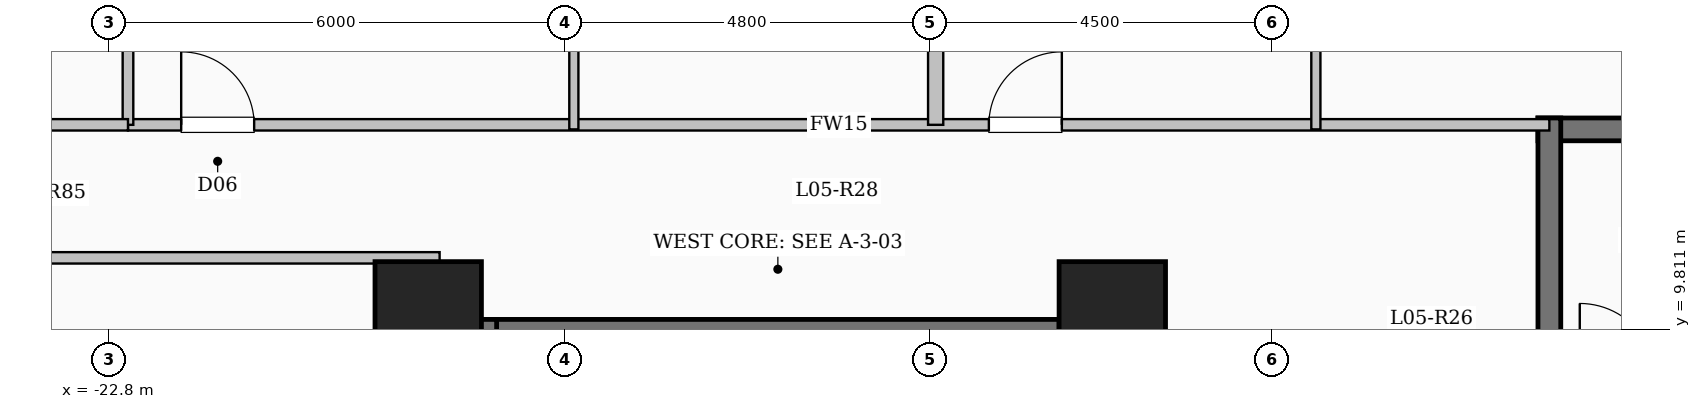
"""IFC4 building model, lengths in metres.
Left out: names, types, materials, properties, quantities, classifications, styles, units other than length and angle.
Written with IfcOpenShell. Run it as: python <this file> out.ifc"""

import sys

from ifc_helpers import new_model, si_unit, direction, frame, frame_2d, origin, origin_2d, place, context, subcontext, project, spatial, rectangle, extrude, element, fill, save


model = new_model("IFC4")
c1 = context("Model", 3, precision=1e-05, world=origin(), true_north=direction((0.0, 1.0)))
c2 = subcontext(c1, "Body", "Model", "MODEL_VIEW")
j1 = project(units=[si_unit("LENGTHUNIT", "METRE"), si_unit("PLANEANGLEUNIT", "RADIAN")], contexts=[c1])
p1 = place(None, origin())
s1 = spatial("IfcSite", under=j1, at=p1, CompositionType="ELEMENT")
p2 = place(p1, origin())
s2 = spatial("IfcBuilding", under=s1, at=p2, CompositionType="ELEMENT")
p3 = place(p2, frame((0.0, 0.0, 24.0)))
s3 = spatial("IfcBuildingStorey", under=s2, at=p3, CompositionType="ELEMENT", Elevation=24.0)
for number, where, z_axis, x_axis in (
    (1, (-9.6, 10.0, 0.0), (0.0, 0.0, 1.0), (1.0, 0.0, 0.0)),
    (2, (-18.6, 10.0, 0.0), (0.0, 0.0, 1.0), (1.0, 0.0, 0.0)),
):
    element("IfcColumn", number, at=place(p3, frame(where, z_axis=z_axis, x_axis=x_axis)), inside=s3, PredefinedType="COLUMN", context=c2, shape_type="SweptSolid", body=[
        extrude(rectangle(XDim=1.4, YDim=1.4, at=origin_2d()), origin(), (0.0, 0.0, 1.0), 3.35),
    ])
p4 = place(p3, frame((-18.0, 9.79, 0.0), z_axis=(0.0, 0.0, 1.0), x_axis=(1.0, 0.0, 0.0)))
e3 = element("IfcWall", 3, at=p4, inside=s3, PredefinedType="SHEAR", context=c2, shape_type="SweptSolid", body=[
    extrude(rectangle(XDim=8.0, YDim=0.3, at=frame_2d((4.0, 0.0))), origin(), (0.0, 0.0, 1.0), 3.35),
])
for number, where, z_axis, x_axis in (
    (4, (-17.85, 6.35, 0.0), (0.0, 0.0, 1.0), (0.0, 1.0, 0.0)),
    (5, (-10.15, 6.35, 0.0), (0.0, 0.0, 1.0), (0.0, 1.0, 0.0)),
):
    element("IfcWall", number, at=place(p3, frame(where, z_axis=z_axis, x_axis=x_axis)), inside=s3, PredefinedType="SHEAR", context=c2, shape_type="SweptSolid", body=[
        extrude(rectangle(XDim=3.59, YDim=0.3, at=frame_2d((1.795, 0.0))), origin(), (0.0, 0.0, 1.0), 3.35),
    ])
p5 = place(p3, frame((-4.0, 12.44, 0.0), z_axis=(0.0, 0.0, 1.0), x_axis=(1.0, 0.0, 0.0)))
e6 = element("IfcWall", 6, at=p5, inside=s3, PredefinedType="SHEAR", context=c2, shape_type="SweptSolid", body=[
    extrude(rectangle(XDim=8.0, YDim=0.3, at=frame_2d((4.0, 0.0))), origin(), (0.0, 0.0, 1.0), 3.35),
])
p6 = place(p3, frame((-3.85, 9.0, 0.0), z_axis=(0.0, 0.0, 1.0), x_axis=(0.0, 1.0, 0.0)))
e7 = element("IfcWall", 7, at=p6, inside=s3, PredefinedType="SHEAR", context=c2, shape_type="SweptSolid", body=[
    extrude(rectangle(XDim=3.59, YDim=0.3, at=frame_2d((1.795, 0.0))), origin(), (0.0, 0.0, 1.0), 3.35),
])
p7 = place(p3, frame((-22.55, 12.5, 0.0), z_axis=(0.0, 0.0, 1.0), x_axis=(1.0, 0.0, 0.0)))
e8 = element("IfcWall", 8, at=p7, inside=s3, PredefinedType="PARTITIONING", context=c2, shape_type="SweptSolid", body=[
    extrude(rectangle(XDim=18.7, YDim=0.15, at=frame_2d((9.35, 0.0))), origin(), (0.0, 0.0, 1.0), 3.1),
])
p8 = place(p7, frame((0.7, 0.0, 0.0)))
e9 = element("IfcOpeningElement", 9, at=p8, cuts=e8, PredefinedType="OPENING", context=c2, shape_type="SweptSolid", body=[
    extrude(rectangle(XDim=0.96, YDim=2.15, at=frame_2d((0.48, 1.075))), frame((0.0, 0.085, 0.0), z_axis=(0.0, -1.0, 0.0), x_axis=(1.0, 0.0, 0.0)), (0.0, 0.0, 1.0), 0.17),
])
p9 = place(p7, frame((11.326, 0.0, 0.0)))
e10 = element("IfcOpeningElement", 10, at=p9, cuts=e8, PredefinedType="OPENING", context=c2, shape_type="SweptSolid", body=[
    extrude(rectangle(XDim=0.96, YDim=2.15, at=frame_2d((0.48, 1.075))), frame((0.0, 0.085, 0.0), z_axis=(0.0, -1.0, 0.0), x_axis=(1.0, 0.0, 0.0)), (0.0, 0.0, 1.0), 0.17),
])
p10 = place(p3, frame((-11.924, 12.5, 0.0), z_axis=(0.0, 0.0, 1.0), x_axis=(0.0, 1.0, 0.0)))
e11 = element("IfcWall", 11, at=p10, inside=s3, PredefinedType="SOLIDWALL", context=c2, shape_type="SweptSolid", body=[
    extrude(rectangle(XDim=11.1, YDim=0.2, at=frame_2d((5.55, 0.0))), origin(), (0.0, 0.0, 1.0), 3.1),
])
p11 = place(p3, frame((-16.684, 12.44, 0.0), z_axis=(0.0, 0.0, 1.0), x_axis=(0.0, 1.0, 0.0)))
e12 = element("IfcWall", 12, at=p11, inside=s3, PredefinedType="PARTITIONING", context=c2, shape_type="SweptSolid", body=[
    extrude(rectangle(XDim=3.21, YDim=0.12, at=frame_2d((1.605, 0.0))), origin(), (0.0, 0.0, 1.0), 3.1),
])
p12 = place(p11, frame((1.195, 0.0, 0.0)))
e13 = element("IfcOpeningElement", 13, at=p12, cuts=e12, PredefinedType="OPENING", context=c2, shape_type="SweptSolid", body=[
    extrude(rectangle(XDim=0.88, YDim=2.1, at=frame_2d((0.44, 1.05))), frame((0.0, 0.07, 0.0), z_axis=(0.0, -1.0, 0.0), x_axis=(1.0, 0.0, 0.0)), (0.0, 0.0, 1.0), 0.14),
])
p13 = place(p3, frame((-6.922, 12.44, 0.0), z_axis=(0.0, 0.0, 1.0), x_axis=(0.0, 1.0, 0.0)))
e14 = element("IfcWall", 14, at=p13, inside=s3, PredefinedType="PARTITIONING", context=c2, shape_type="SweptSolid", body=[
    extrude(rectangle(XDim=12.166, YDim=0.12, at=frame_2d((6.083, 0.0))), origin(), (0.0, 0.0, 1.0), 3.1),
])
p14 = place(p13, frame((3.075, 0.0, 0.0)))
e15 = element("IfcOpeningElement", 15, at=p14, cuts=e14, PredefinedType="OPENING", context=c2, shape_type="SweptSolid", body=[
    extrude(rectangle(XDim=1.08, YDim=2.15, at=frame_2d((0.54, 1.075))), frame((0.0, 0.07, 0.0), z_axis=(0.0, -1.0, 0.0), x_axis=(1.0, 0.0, 0.0)), (0.0, 0.0, 1.0), 0.14),
])
p15 = place(p3, frame((-28.68, 10.75, 0.0), z_axis=(0.0, 0.0, 1.0), x_axis=(1.0, 0.0, 0.0)))
e16 = element("IfcWall", 16, at=p15, inside=s3, PredefinedType="PARTITIONING", context=c2, shape_type="SweptSolid", body=[
    extrude(rectangle(XDim=10.23, YDim=0.15, at=frame_2d((5.115, 0.0))), origin(), (0.0, 0.0, 1.0), 3.1),
])
p16 = place(p3, frame((-22.55, 12.5, 0.0), z_axis=(0.0, 0.0, 1.0), x_axis=(0.0, 1.0, 0.0)))
e17 = element("IfcWall", 17, at=p16, inside=s3, PredefinedType="PARTITIONING", context=c2, shape_type="SweptSolid", body=[
    extrude(rectangle(XDim=6.55, YDim=0.14, at=frame_2d((3.275, 0.0))), origin(), (0.0, 0.0, 1.0), 3.1),
])
p17 = place(p3, frame((-28.68, 12.5, 0.0), z_axis=(0.0, 0.0, 1.0), x_axis=(1.0, 0.0, 0.0)))
e18 = element("IfcWall", 18, at=p17, inside=s3, PredefinedType="PARTITIONING", context=c2, shape_type="SweptSolid", body=[
    extrude(rectangle(XDim=6.13, YDim=0.15, at=frame_2d((3.065, 0.0))), origin(), (0.0, 0.0, 1.0), 3.1),
])
p18 = place(p17, frame((2.59, 0.0, 0.0)))
e19 = element("IfcOpeningElement", 19, at=p18, cuts=e18, PredefinedType="OPENING", context=c2, shape_type="SweptSolid", body=[
    extrude(rectangle(XDim=0.95, YDim=2.15, at=frame_2d((0.475, 1.075))), frame((0.0, 0.085, 0.0), z_axis=(0.0, -1.0, 0.0), x_axis=(1.0, 0.0, 0.0)), (0.0, 0.0, 1.0), 0.17),
])
p19 = place(p8, origin())
e20 = element("IfcDoor", 20, at=p19, inside=s3, OperationType="SINGLE_SWING_LEFT", PredefinedType="DOOR", context=c2, shape_type="SweptSolid", body=[
    extrude(rectangle(XDim=0.96, YDim=2.15, at=frame_2d((0.48, 1.075))), frame((0.0, 0.025, 0.0), z_axis=(0.0, -1.0, 0.0), x_axis=(1.0, 0.0, 0.0)), (0.0, 0.0, 1.0), 0.05),
])
fill(e9, e20)
p20 = place(p9, origin())
e21 = element("IfcDoor", 21, at=p20, inside=s3, OperationType="SINGLE_SWING_RIGHT", PredefinedType="DOOR", context=c2, shape_type="SweptSolid", body=[
    extrude(rectangle(XDim=0.96, YDim=2.15, at=frame_2d((0.48, 1.075))), frame((0.0, 0.025, 0.0), z_axis=(0.0, -1.0, 0.0), x_axis=(1.0, 0.0, 0.0)), (0.0, 0.0, 1.0), 0.05),
])
fill(e10, e21)
save(model, sys.argv[1])
